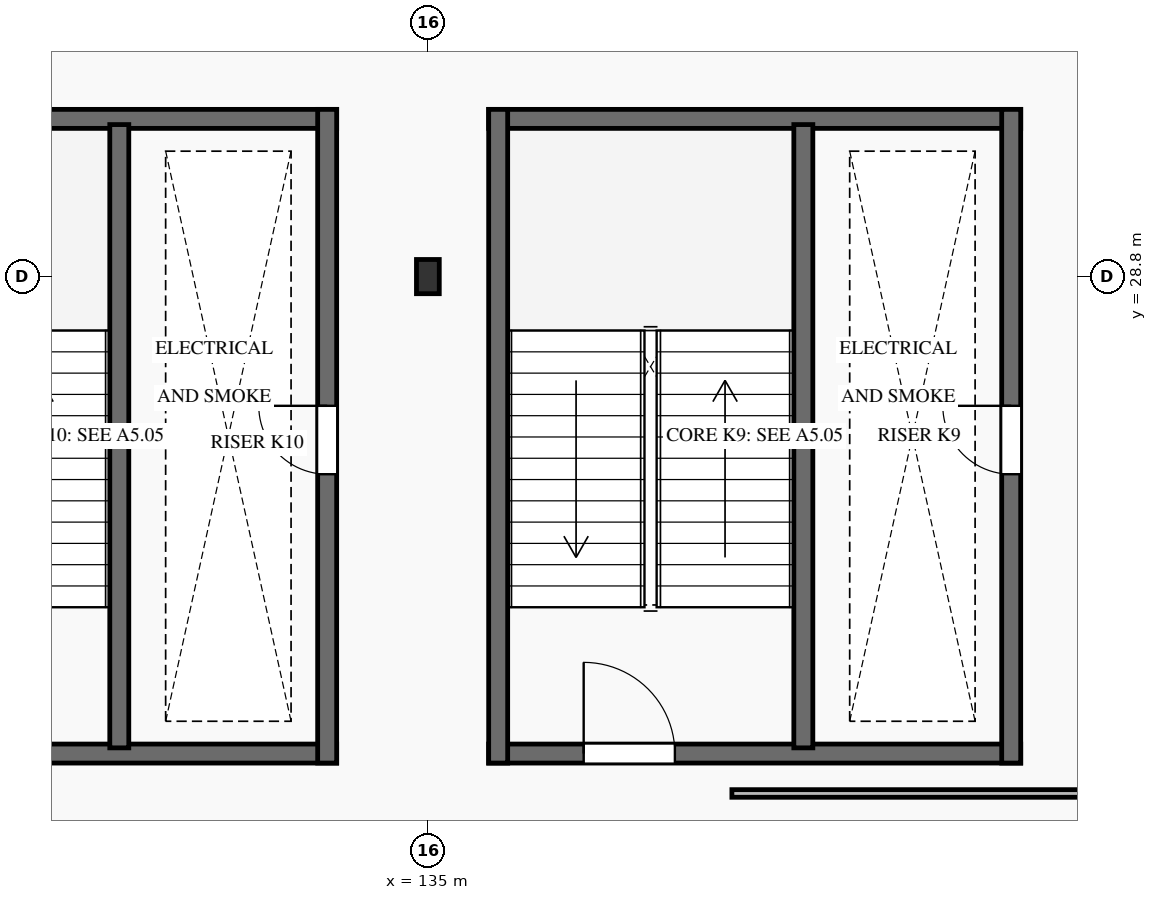
"""IFC4 building model, lengths in metres.
Left out: names, types, materials, properties, quantities, classifications, styles, units other than length and angle.
Written with IfcOpenShell. Run it as: python <this file> out.ifc"""

import sys

from ifc_helpers import new_model, si_unit, direction, frame, frame_2d, origin, origin_2d, place, context, subcontext, project, spatial, rectangle, i_section, extrude, element, fill, save


model = new_model("IFC4")
c1 = context("Model", 3, precision=1e-05, world=origin(), true_north=direction((0.0, 1.0)))
c2 = subcontext(c1, "Body", "Model", "MODEL_VIEW")
j1 = project(units=[si_unit("LENGTHUNIT", "METRE"), si_unit("PLANEANGLEUNIT", "RADIAN")], contexts=[c1])
p1 = place(None, origin())
s1 = spatial("IfcSite", under=j1, at=p1, CompositionType="ELEMENT")
p2 = place(p1, origin())
s2 = spatial("IfcBuilding", under=s1, at=p2, CompositionType="ELEMENT")
p3 = place(p2, frame((0.0, 0.0, 6.0)))
s3 = spatial("IfcBuildingStorey", under=s2, at=p3, CompositionType="ELEMENT", Elevation=6.0)
p4 = place(p3, frame((135.0, 28.8, 0.0), z_axis=(0.0, 0.0, 1.0), x_axis=(1.0, 0.0, 0.0)))
e1 = element("IfcColumn", 1, at=p4, inside=s3, PredefinedType="COLUMN", context=c2, shape_type="SweptSolid", body=[
    extrude(i_section(OverallWidth=0.3, OverallDepth=0.45, WebThickness=0.014, FlangeThickness=0.026, FilletRadius=0.027, at=origin_2d()), origin(), (0.0, 0.0, 1.0), 4.8),
])
p5 = place(p3, frame((135.8, 22.525, 0.0), z_axis=(0.0, 0.0, 1.0), x_axis=(1.0, 0.0, 0.0)))
e2 = element("IfcWall", 2, at=p5, inside=s3, PredefinedType="SHEAR", context=c2, shape_type="SweptSolid", body=[
    extrude(rectangle(XDim=7.0, YDim=0.25, at=frame_2d((3.5, 0.0))), origin(), (0.0, 0.0, 1.0), 4.8),
])
p6 = place(p5, frame((1.25, 0.0, 0.0)))
e3 = element("IfcOpeningElement", 3, at=p6, cuts=e2, PredefinedType="OPENING", context=c2, shape_type="SweptSolid", body=[
    extrude(rectangle(XDim=1.2, YDim=2.15, at=frame_2d((0.6, 1.075))), frame((0.0, 0.14, 0.0), z_axis=(0.0, -1.0, 0.0), x_axis=(1.0, 0.0, 0.0)), (0.0, 0.0, 1.0), 0.28),
])
p7 = place(p3, frame((135.8, 30.875, 0.0), z_axis=(0.0, 0.0, 1.0), x_axis=(1.0, 0.0, 0.0)))
e4 = element("IfcWall", 4, at=p7, inside=s3, PredefinedType="SHEAR", context=c2, shape_type="SweptSolid", body=[
    extrude(rectangle(XDim=7.0, YDim=0.25, at=frame_2d((3.5, 0.0))), origin(), (0.0, 0.0, 1.0), 4.8),
])
p8 = place(p3, frame((135.925, 22.4, 0.0), z_axis=(0.0, 0.0, 1.0), x_axis=(0.0, 1.0, 0.0)))
e5 = element("IfcWall", 5, at=p8, inside=s3, PredefinedType="SHEAR", context=c2, shape_type="SweptSolid", body=[
    extrude(rectangle(XDim=8.6, YDim=0.25, at=frame_2d((4.3, 0.0))), origin(), (0.0, 0.0, 1.0), 4.8),
])
p9 = place(p3, frame((142.675, 22.4, 0.0), z_axis=(0.0, 0.0, 1.0), x_axis=(0.0, 1.0, 0.0)))
e6 = element("IfcWall", 6, at=p9, inside=s3, PredefinedType="SHEAR", context=c2, shape_type="SweptSolid", body=[
    extrude(rectangle(XDim=8.6, YDim=0.25, at=frame_2d((4.3, 0.0))), origin(), (0.0, 0.0, 1.0), 4.8),
])
p10 = place(p9, frame((3.8, 0.0, 0.0)))
e7 = element("IfcOpeningElement", 7, at=p10, cuts=e6, PredefinedType="OPENING", context=c2, shape_type="SweptSolid", body=[
    extrude(rectangle(XDim=0.9, YDim=2.05, at=frame_2d((0.45, 1.025))), frame((0.0, 0.14, 0.0), z_axis=(0.0, -1.0, 0.0), x_axis=(1.0, 0.0, 0.0)), (0.0, 0.0, 1.0), 0.28),
])
p11 = place(p3, frame((139.94, 22.6, 0.0), z_axis=(0.0, 0.0, 1.0), x_axis=(0.0, 1.0, 0.0)))
e8 = element("IfcWall", 8, at=p11, inside=s3, PredefinedType="SHEAR", context=c2, shape_type="SweptSolid", body=[
    extrude(rectangle(XDim=8.2, YDim=0.25, at=frame_2d((4.1, 0.0))), origin(), (0.0, 0.0, 1.0), 4.8),
])
p12 = place(p3, frame((126.8, 22.525, 0.0), z_axis=(0.0, 0.0, 1.0), x_axis=(1.0, 0.0, 0.0)))
e9 = element("IfcWall", 9, at=p12, inside=s3, PredefinedType="SHEAR", context=c2, shape_type="SweptSolid", body=[
    extrude(rectangle(XDim=7.0, YDim=0.25, at=frame_2d((3.5, 0.0))), origin(), (0.0, 0.0, 1.0), 4.8),
])
p13 = place(p12, frame((1.25, 0.0, 0.0)))
e10 = element("IfcOpeningElement", 10, at=p13, cuts=e9, PredefinedType="OPENING", context=c2, shape_type="SweptSolid", body=[
    extrude(rectangle(XDim=1.2, YDim=2.15, at=frame_2d((0.6, 1.075))), frame((0.0, 0.14, 0.0), z_axis=(0.0, -1.0, 0.0), x_axis=(1.0, 0.0, 0.0)), (0.0, 0.0, 1.0), 0.28),
])
p14 = place(p3, frame((126.8, 30.875, 0.0), z_axis=(0.0, 0.0, 1.0), x_axis=(1.0, 0.0, 0.0)))
e11 = element("IfcWall", 11, at=p14, inside=s3, PredefinedType="SHEAR", context=c2, shape_type="SweptSolid", body=[
    extrude(rectangle(XDim=7.0, YDim=0.25, at=frame_2d((3.5, 0.0))), origin(), (0.0, 0.0, 1.0), 4.8),
])
p15 = place(p3, frame((133.675, 22.4, 0.0), z_axis=(0.0, 0.0, 1.0), x_axis=(0.0, 1.0, 0.0)))
e12 = element("IfcWall", 12, at=p15, inside=s3, PredefinedType="SHEAR", context=c2, shape_type="SweptSolid", body=[
    extrude(rectangle(XDim=8.6, YDim=0.25, at=frame_2d((4.3, 0.0))), origin(), (0.0, 0.0, 1.0), 4.8),
])
p16 = place(p15, frame((3.8, 0.0, 0.0)))
e13 = element("IfcOpeningElement", 13, at=p16, cuts=e12, PredefinedType="OPENING", context=c2, shape_type="SweptSolid", body=[
    extrude(rectangle(XDim=0.9, YDim=2.05, at=frame_2d((0.45, 1.025))), frame((0.0, 0.14, 0.0), z_axis=(0.0, -1.0, 0.0), x_axis=(1.0, 0.0, 0.0)), (0.0, 0.0, 1.0), 0.28),
])
p17 = place(p3, frame((130.94, 22.6, 0.0), z_axis=(0.0, 0.0, 1.0), x_axis=(0.0, 1.0, 0.0)))
e14 = element("IfcWall", 14, at=p17, inside=s3, PredefinedType="SHEAR", context=c2, shape_type="SweptSolid", body=[
    extrude(rectangle(XDim=8.2, YDim=0.25, at=frame_2d((4.1, 0.0))), origin(), (0.0, 0.0, 1.0), 4.8),
])
p18 = place(p3, frame((139.0, 22.0, 0.0), z_axis=(0.0, 0.0, 1.0), x_axis=(1.0, 0.0, 0.0)))
e15 = element("IfcWall", 15, at=p18, inside=s3, PredefinedType="PARTITIONING", context=c2, shape_type="SweptSolid", body=[
    extrude(rectangle(XDim=13.45, YDim=0.1, at=frame_2d((6.725, 0.0))), origin(), (0.0, 0.0, 1.0), 4.53),
])
p19 = place(p18, frame((5.825, 0.0, 0.0)))
e16 = element("IfcOpeningElement", 16, at=p19, cuts=e15, PredefinedType="OPENING", context=c2, shape_type="SweptSolid", body=[
    extrude(rectangle(XDim=1.8, YDim=2.3, at=frame_2d((0.9, 1.15))), frame((0.0, 0.065, 0.0), z_axis=(0.0, -1.0, 0.0), x_axis=(1.0, 0.0, 0.0)), (0.0, 0.0, 1.0), 0.13),
])
p20 = place(p6, origin())
e17 = element("IfcDoor", 17, at=p20, inside=s3, OperationType="SINGLE_SWING_LEFT", PredefinedType="DOOR", context=c2, shape_type="SweptSolid", body=[
    extrude(rectangle(XDim=1.2, YDim=2.15, at=frame_2d((0.6, 1.075))), frame((0.0, 0.025, 0.0), z_axis=(0.0, -1.0, 0.0), x_axis=(1.0, 0.0, 0.0)), (0.0, 0.0, 1.0), 0.05),
])
fill(e3, e17)
p21 = place(p10, origin())
e18 = element("IfcDoor", 18, at=p21, inside=s3, OperationType="SINGLE_SWING_RIGHT", PredefinedType="DOOR", context=c2, shape_type="SweptSolid", body=[
    extrude(rectangle(XDim=0.9, YDim=2.05, at=frame_2d((0.45, 1.025))), frame((0.0, 0.025, 0.0), z_axis=(0.0, -1.0, 0.0), x_axis=(1.0, 0.0, 0.0)), (0.0, 0.0, 1.0), 0.05),
])
fill(e7, e18)
p22 = place(p16, origin())
e19 = element("IfcDoor", 19, at=p22, inside=s3, OperationType="SINGLE_SWING_RIGHT", PredefinedType="DOOR", context=c2, shape_type="SweptSolid", body=[
    extrude(rectangle(XDim=0.9, YDim=2.05, at=frame_2d((0.45, 1.025))), frame((0.0, 0.025, 0.0), z_axis=(0.0, -1.0, 0.0), x_axis=(1.0, 0.0, 0.0)), (0.0, 0.0, 1.0), 0.05),
])
fill(e13, e19)
save(model, sys.argv[1])
